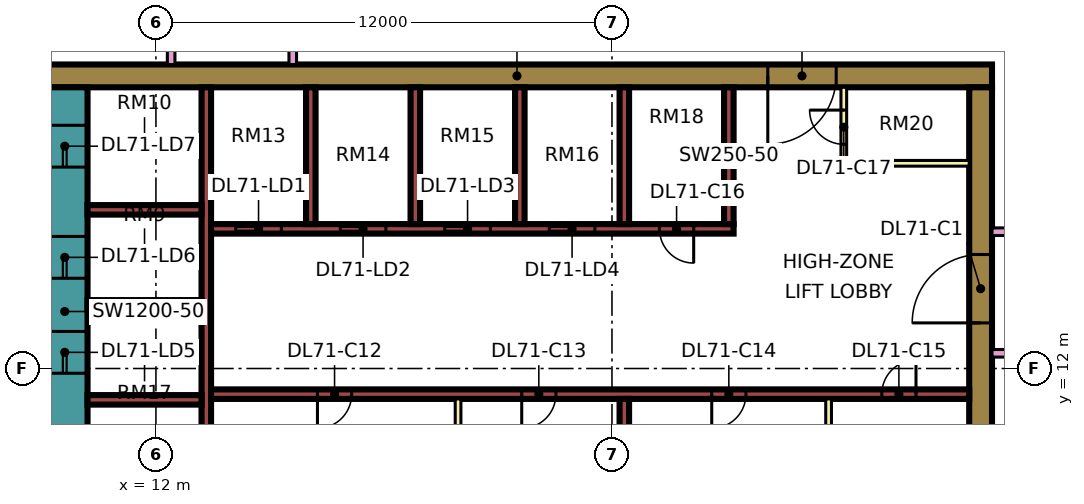
"""IFC4 building model, lengths in metres.
Left out: names, types, materials, properties, quantities, classifications, styles, units other than length and angle.
Written with IfcOpenShell. Run it as: python <this file> out.ifc"""

import sys

from ifc_helpers import new_model, si_unit, direction, frame, frame_2d, origin, place, context, subcontext, project, spatial, rectangle, extrude, element, fill, save


model = new_model("IFC4")
c1 = context("Model", 3, precision=1e-05, world=origin(), true_north=direction((0.0, 1.0)))
c2 = subcontext(c1, "Body", "Model", "MODEL_VIEW")
j1 = project(units=[si_unit("LENGTHUNIT", "METRE"), si_unit("PLANEANGLEUNIT", "RADIAN")], contexts=[c1])
p1 = place(None, origin())
s1 = spatial("IfcSite", under=j1, at=p1, CompositionType="ELEMENT")
p2 = place(p1, origin())
s2 = spatial("IfcBuilding", under=s1, at=p2, CompositionType="ELEMENT")
p3 = place(p2, frame((0.0, 0.0, 303.4)))
s3 = spatial("IfcBuildingStorey", under=s2, at=p3, CompositionType="ELEMENT", Elevation=303.4)
p4 = place(p3, frame((9.0, 19.7, 0.0), z_axis=(0.0, 0.0, 1.0), x_axis=(1.0, 0.0, 0.0)))
e1 = element("IfcWall", 1, at=p4, inside=s3, PredefinedType="SHEAR", context=c2, shape_type="SweptSolid", body=[
    extrude(rectangle(XDim=25.0, YDim=0.6, at=frame_2d((12.5, 0.0))), origin(), (0.0, 0.0, 1.0), 3.75),
])
p5 = place(p4, frame((19.1, 0.0, 0.0)))
e2 = element("IfcOpeningElement", 2, at=p5, cuts=e1, PredefinedType="OPENING", context=c2, shape_type="SweptSolid", body=[
    extrude(rectangle(XDim=1.8, YDim=2.4, at=frame_2d((0.9, 1.2))), frame((0.0, 0.31, 0.0), z_axis=(0.0, -1.0, 0.0), x_axis=(1.0, 0.0, 0.0)), (0.0, 0.0, 1.0), 0.62),
])
p6 = place(p3, frame((9.6, 7.6, 0.0), z_axis=(0.0, 0.0, 1.0), x_axis=(0.0, 1.0, 0.0)))
e3 = element("IfcWall", 3, at=p6, inside=s3, PredefinedType="SHEAR", context=c2, shape_type="SweptSolid", body=[
    extrude(rectangle(XDim=11.8, YDim=1.2, at=frame_2d((5.9, 0.0))), origin(), (0.0, 0.0, 1.0), 3.75),
])
p7 = place(p6, frame((4.275, 0.0, 0.0)))
e4 = element("IfcOpeningElement", 4, at=p7, cuts=e3, PredefinedType="OPENING", context=c2, shape_type="SweptSolid", body=[
    extrude(rectangle(XDim=1.1, YDim=2.2, at=frame_2d((0.55, 1.1))), frame((0.0, 0.61, 0.0), z_axis=(0.0, -1.0, 0.0), x_axis=(1.0, 0.0, 0.0)), (0.0, 0.0, 1.0), 1.22),
])
p8 = place(p6, frame((6.775, 0.0, 0.0)))
e5 = element("IfcOpeningElement", 5, at=p8, cuts=e3, PredefinedType="OPENING", context=c2, shape_type="SweptSolid", body=[
    extrude(rectangle(XDim=1.1, YDim=2.2, at=frame_2d((0.55, 1.1))), frame((0.0, 0.61, 0.0), z_axis=(0.0, -1.0, 0.0), x_axis=(1.0, 0.0, 0.0)), (0.0, 0.0, 1.0), 1.22),
])
p9 = place(p6, frame((9.7, 0.0, 0.0)))
e6 = element("IfcOpeningElement", 6, at=p9, cuts=e3, PredefinedType="OPENING", context=c2, shape_type="SweptSolid", body=[
    extrude(rectangle(XDim=1.1, YDim=2.2, at=frame_2d((0.55, 1.1))), frame((0.0, 0.61, 0.0), z_axis=(0.0, -1.0, 0.0), x_axis=(1.0, 0.0, 0.0)), (0.0, 0.0, 1.0), 1.22),
])
p10 = place(p6, frame((1.95, 0.0, 0.0)))
e7 = element("IfcOpeningElement", 7, at=p10, cuts=e3, PredefinedType="OPENING", context=c2, shape_type="SweptSolid", body=[
    extrude(rectangle(XDim=0.9, YDim=2.1, at=frame_2d((0.45, 1.05))), frame((0.0, 0.61, 0.0), z_axis=(0.0, -1.0, 0.0), x_axis=(1.0, 0.0, 0.0)), (0.0, 0.0, 1.0), 1.22),
])
p11 = place(p3, frame((33.7, 7.6, 0.0), z_axis=(0.0, 0.0, 1.0), x_axis=(0.0, 1.0, 0.0)))
e8 = element("IfcWall", 8, at=p11, inside=s3, PredefinedType="SHEAR", context=c2, shape_type="SweptSolid", body=[
    extrude(rectangle(XDim=11.8, YDim=0.6, at=frame_2d((5.9, 0.0))), origin(), (0.0, 0.0, 1.0), 3.75),
])
p12 = place(p11, frame((5.6, 0.0, 0.0)))
e9 = element("IfcOpeningElement", 9, at=p12, cuts=e8, PredefinedType="OPENING", context=c2, shape_type="SweptSolid", body=[
    extrude(rectangle(XDim=1.8, YDim=2.4, at=frame_2d((0.9, 1.2))), frame((0.0, 0.31, 0.0), z_axis=(0.0, -1.0, 0.0), x_axis=(1.0, 0.0, 0.0)), (0.0, 0.0, 1.0), 0.62),
])
p13 = place(p3, frame((13.325, 7.6, 0.0), z_axis=(0.0, 0.0, 1.0), x_axis=(0.0, 1.0, 0.0)))
e10 = element("IfcWall", 10, at=p13, inside=s3, PredefinedType="SHEAR", context=c2, shape_type="SweptSolid", body=[
    extrude(rectangle(XDim=11.8, YDim=0.25, at=frame_2d((5.9, 0.0))), origin(), (0.0, 0.0, 1.0), 3.75),
])
p14 = place(p3, frame((13.45, 11.325, 0.0), z_axis=(0.0, 0.0, 1.0), x_axis=(1.0, 0.0, 0.0)))
e11 = element("IfcWall", 11, at=p14, inside=s3, PredefinedType="SHEAR", context=c2, shape_type="SweptSolid", body=[
    extrude(rectangle(XDim=19.95, YDim=0.25, at=frame_2d((9.975, 0.0))), origin(), (0.0, 0.0, 1.0), 3.75),
])
p15 = place(p14, frame((2.8, 0.0, 0.0)))
e12 = element("IfcOpeningElement", 12, at=p15, cuts=e11, PredefinedType="OPENING", context=c2, shape_type="SweptSolid", body=[
    extrude(rectangle(XDim=0.9, YDim=2.1, at=frame_2d((0.45, 1.05))), frame((0.0, 0.135, 0.0), z_axis=(0.0, -1.0, 0.0), x_axis=(1.0, 0.0, 0.0)), (0.0, 0.0, 1.0), 0.27),
])
p16 = place(p14, frame((8.175, 0.0, 0.0)))
e13 = element("IfcOpeningElement", 13, at=p16, cuts=e11, PredefinedType="OPENING", context=c2, shape_type="SweptSolid", body=[
    extrude(rectangle(XDim=0.9, YDim=2.1, at=frame_2d((0.45, 1.05))), frame((0.0, 0.135, 0.0), z_axis=(0.0, -1.0, 0.0), x_axis=(1.0, 0.0, 0.0)), (0.0, 0.0, 1.0), 0.27),
])
p17 = place(p14, frame((13.175, 0.0, 0.0)))
e14 = element("IfcOpeningElement", 14, at=p17, cuts=e11, PredefinedType="OPENING", context=c2, shape_type="SweptSolid", body=[
    extrude(rectangle(XDim=0.9, YDim=2.1, at=frame_2d((0.45, 1.05))), frame((0.0, 0.135, 0.0), z_axis=(0.0, -1.0, 0.0), x_axis=(1.0, 0.0, 0.0)), (0.0, 0.0, 1.0), 0.27),
])
p18 = place(p14, frame((17.65, 0.0, 0.0)))
e15 = element("IfcOpeningElement", 15, at=p18, cuts=e11, PredefinedType="OPENING", context=c2, shape_type="SweptSolid", body=[
    extrude(rectangle(XDim=0.9, YDim=2.1, at=frame_2d((0.45, 1.05))), frame((0.0, 0.135, 0.0), z_axis=(0.0, -1.0, 0.0), x_axis=(1.0, 0.0, 0.0)), (0.0, 0.0, 1.0), 0.27),
])
p19 = place(p3, frame((13.45, 15.675, 0.0), z_axis=(0.0, 0.0, 1.0), x_axis=(1.0, 0.0, 0.0)))
e16 = element("IfcWall", 16, at=p19, inside=s3, PredefinedType="SHEAR", context=c2, shape_type="SweptSolid", body=[
    extrude(rectangle(XDim=13.75, YDim=0.25, at=frame_2d((6.875, 0.0))), origin(), (0.0, 0.0, 1.0), 3.75),
])
p20 = place(p19, frame((0.65, 0.0, 0.0)))
e17 = element("IfcOpeningElement", 17, at=p20, cuts=e16, PredefinedType="OPENING", context=c2, shape_type="SweptSolid", body=[
    extrude(rectangle(XDim=1.2, YDim=2.2, at=frame_2d((0.6, 1.1))), frame((0.0, 0.135, 0.0), z_axis=(0.0, -1.0, 0.0), x_axis=(1.0, 0.0, 0.0)), (0.0, 0.0, 1.0), 0.27),
])
p21 = place(p19, frame((3.4, 0.0, 0.0)))
e18 = element("IfcOpeningElement", 18, at=p21, cuts=e16, PredefinedType="OPENING", context=c2, shape_type="SweptSolid", body=[
    extrude(rectangle(XDim=1.2, YDim=2.2, at=frame_2d((0.6, 1.1))), frame((0.0, 0.135, 0.0), z_axis=(0.0, -1.0, 0.0), x_axis=(1.0, 0.0, 0.0)), (0.0, 0.0, 1.0), 0.27),
])
p22 = place(p19, frame((6.15, 0.0, 0.0)))
e19 = element("IfcOpeningElement", 19, at=p22, cuts=e16, PredefinedType="OPENING", context=c2, shape_type="SweptSolid", body=[
    extrude(rectangle(XDim=1.2, YDim=2.2, at=frame_2d((0.6, 1.1))), frame((0.0, 0.135, 0.0), z_axis=(0.0, -1.0, 0.0), x_axis=(1.0, 0.0, 0.0)), (0.0, 0.0, 1.0), 0.27),
])
p23 = place(p19, frame((8.9, 0.0, 0.0)))
e20 = element("IfcOpeningElement", 20, at=p23, cuts=e16, PredefinedType="OPENING", context=c2, shape_type="SweptSolid", body=[
    extrude(rectangle(XDim=1.2, YDim=2.2, at=frame_2d((0.6, 1.1))), frame((0.0, 0.135, 0.0), z_axis=(0.0, -1.0, 0.0), x_axis=(1.0, 0.0, 0.0)), (0.0, 0.0, 1.0), 0.27),
])
p24 = place(p19, frame((11.8, 0.0, 0.0)))
e21 = element("IfcOpeningElement", 21, at=p24, cuts=e16, PredefinedType="OPENING", context=c2, shape_type="SweptSolid", body=[
    extrude(rectangle(XDim=0.9, YDim=2.1, at=frame_2d((0.45, 1.05))), frame((0.0, 0.135, 0.0), z_axis=(0.0, -1.0, 0.0), x_axis=(1.0, 0.0, 0.0)), (0.0, 0.0, 1.0), 0.27),
])
for number, where, z_axis, x_axis in (
    (22, (10.2, 11.175, 0.0), (0.0, 0.0, 1.0), (1.0, 0.0, 0.0)),
    (23, (10.2, 13.675, 0.0), (0.0, 0.0, 1.0), (1.0, 0.0, 0.0)),
    (24, (10.2, 16.175, 0.0), (0.0, 0.0, 1.0), (1.0, 0.0, 0.0)),
):
    element("IfcWall", number, at=place(p3, frame(where, z_axis=z_axis, x_axis=x_axis)), inside=s3, PredefinedType="SHEAR", context=c2, shape_type="SweptSolid", body=[
        extrude(rectangle(XDim=3.0, YDim=0.25, at=frame_2d((1.5, 0.0))), origin(), (0.0, 0.0, 1.0), 3.75),
    ])
for number, where, z_axis, x_axis in (
    (25, (24.325, 7.6, 0.0), (0.0, 0.0, 1.0), (0.0, 1.0, 0.0)),
    (26, (16.075, 15.8, 0.0), (0.0, 0.0, 1.0), (0.0, 1.0, 0.0)),
    (27, (18.825, 15.8, 0.0), (0.0, 0.0, 1.0), (0.0, 1.0, 0.0)),
    (28, (21.575, 15.8, 0.0), (0.0, 0.0, 1.0), (0.0, 1.0, 0.0)),
    (29, (24.325, 15.8, 0.0), (0.0, 0.0, 1.0), (0.0, 1.0, 0.0)),
    (30, (27.075, 15.8, 0.0), (0.0, 0.0, 1.0), (0.0, 1.0, 0.0)),
):
    element("IfcWall", number, at=place(p3, frame(where, z_axis=z_axis, x_axis=x_axis)), inside=s3, PredefinedType="SHEAR", context=c2, shape_type="SweptSolid", body=[
        extrude(rectangle(XDim=3.6, YDim=0.25, at=frame_2d((1.8, 0.0))), origin(), (0.0, 0.0, 1.0), 3.75),
    ])
p25 = place(p3, frame((-1.447, 12.553, 0.0), z_axis=(0.0, 0.0, 1.0), x_axis=(0.707106781187, -0.707106781187, 0.0)))
e31 = element("IfcWall", 31, at=p25, inside=s3, PredefinedType="SOLIDWALL", context=c2, shape_type="SweptSolid", body=[
    extrude(rectangle(XDim=19.799, YDim=0.15, at=frame_2d((9.899, 0.0))), origin(), (0.0, 0.0, 1.0), 3.35),
])
p26 = place(p25, frame((2.212, 0.0, 0.45)))
e32 = element("IfcOpeningElement", 32, at=p26, cuts=e31, PredefinedType="OPENING", context=c2, shape_type="SweptSolid", body=[
    extrude(rectangle(XDim=3.0, YDim=2.4, at=frame_2d((1.5, 1.2))), frame((0.0, 0.085, 0.0), z_axis=(0.0, -1.0, 0.0), x_axis=(1.0, 0.0, 0.0)), (0.0, 0.0, 1.0), 0.17),
])
p27 = place(p25, frame((10.216, 0.0, 0.45)))
e33 = element("IfcOpeningElement", 33, at=p27, cuts=e31, PredefinedType="OPENING", context=c2, shape_type="SweptSolid", body=[
    extrude(rectangle(XDim=3.0, YDim=2.4, at=frame_2d((1.5, 1.2))), frame((0.0, 0.085, 0.0), z_axis=(0.0, -1.0, 0.0), x_axis=(1.0, 0.0, 0.0)), (0.0, 0.0, 1.0), 0.17),
])
for number, where, z_axis, x_axis in (
    (34, (19.95, 7.6, 0.0), (0.0, 0.0, 1.0), (0.0, 1.0, 0.0)),
    (35, (29.7, 7.6, 0.0), (0.0, 0.0, 1.0), (0.0, 1.0, 0.0)),
):
    element("IfcWall", number, at=place(p3, frame(where, z_axis=z_axis, x_axis=x_axis)), inside=s3, PredefinedType="PARTITIONING", context=c2, shape_type="SweptSolid", body=[
        extrude(rectangle(XDim=3.6, YDim=0.15, at=frame_2d((1.8, 0.0))), origin(), (0.0, 0.0, 1.0), 3.35),
    ])
p28 = place(p3, frame((30.1, 17.4, 0.0), z_axis=(0.0, 0.0, 1.0), x_axis=(0.0, 1.0, 0.0)))
e36 = element("IfcWall", 36, at=p28, inside=s3, PredefinedType="PARTITIONING", context=c2, shape_type="SweptSolid", body=[
    extrude(rectangle(XDim=2.0, YDim=0.15, at=frame_2d((1.0, 0.0))), origin(), (0.0, 0.0, 1.0), 3.35),
])
p29 = place(p28, frame((0.5, 0.0, 0.0)))
e37 = element("IfcOpeningElement", 37, at=p29, cuts=e36, PredefinedType="OPENING", context=c2, shape_type="SweptSolid", body=[
    extrude(rectangle(XDim=0.9, YDim=2.1, at=frame_2d((0.45, 1.05))), frame((0.0, 0.085, 0.0), z_axis=(0.0, -1.0, 0.0), x_axis=(1.0, 0.0, 0.0)), (0.0, 0.0, 1.0), 0.17),
])
p30 = place(p3, frame((30.1, 17.4, 0.0), z_axis=(0.0, 0.0, 1.0), x_axis=(1.0, 0.0, 0.0)))
e38 = element("IfcWall", 38, at=p30, inside=s3, PredefinedType="PARTITIONING", context=c2, shape_type="SweptSolid", body=[
    extrude(rectangle(XDim=3.3, YDim=0.15, at=frame_2d((1.65, 0.0))), origin(), (0.0, 0.0, 1.0), 3.35),
])
p31 = place(p3, frame((12.4, 20.0, 0.0), z_axis=(0.0, 0.0, 1.0), x_axis=(0.0, 1.0, 0.0)))
e39 = element("IfcWall", 39, at=p31, inside=s3, PredefinedType="PARTITIONING", context=c2, shape_type="SweptSolid", body=[
    extrude(rectangle(XDim=34.0, YDim=0.2, at=frame_2d((17.0, 0.0))), origin(), (0.0, 0.0, 1.0), 3.35),
])
p32 = place(p31, frame((19.8, 0.0, 0.0)))
e40 = element("IfcOpeningElement", 40, at=p32, cuts=e39, PredefinedType="OPENING", context=c2, shape_type="SweptSolid", body=[
    extrude(rectangle(XDim=1.0, YDim=2.1, at=frame_2d((0.5, 1.05))), frame((0.0, 0.11, 0.0), z_axis=(0.0, -1.0, 0.0), x_axis=(1.0, 0.0, 0.0)), (0.0, 0.0, 1.0), 0.22),
])
p33 = place(p31, frame((0.6, 0.0, 0.0)))
e41 = element("IfcOpeningElement", 41, at=p33, cuts=e39, PredefinedType="OPENING", context=c2, shape_type="SweptSolid", body=[
    extrude(rectangle(XDim=1.2, YDim=2.1, at=frame_2d((0.6, 1.05))), frame((0.0, 0.11, 0.0), z_axis=(0.0, -1.0, 0.0), x_axis=(1.0, 0.0, 0.0)), (0.0, 0.0, 1.0), 0.22),
])
p34 = place(p31, frame((4.5, 0.0, 0.0)))
e42 = element("IfcOpeningElement", 42, at=p34, cuts=e39, PredefinedType="OPENING", context=c2, shape_type="SweptSolid", body=[
    extrude(rectangle(XDim=1.0, YDim=2.1, at=frame_2d((0.5, 1.05))), frame((0.0, 0.11, 0.0), z_axis=(0.0, -1.0, 0.0), x_axis=(1.0, 0.0, 0.0)), (0.0, 0.0, 1.0), 0.22),
])
p35 = place(p3, frame((15.6, 20.0, 0.0), z_axis=(0.0, 0.0, 1.0), x_axis=(0.0, 1.0, 0.0)))
e43 = element("IfcWall", 43, at=p35, inside=s3, PredefinedType="PARTITIONING", context=c2, shape_type="SweptSolid", body=[
    extrude(rectangle(XDim=27.775, YDim=0.2, at=frame_2d((13.887, 0.0))), origin(), (0.0, 0.0, 1.0), 3.35),
])
p36 = place(p35, frame((7.0, 0.0, 0.0)))
e44 = element("IfcOpeningElement", 44, at=p36, cuts=e43, PredefinedType="OPENING", context=c2, shape_type="SweptSolid", body=[
    extrude(rectangle(XDim=1.0, YDim=2.1, at=frame_2d((0.5, 1.05))), frame((0.0, 0.11, 0.0), z_axis=(0.0, -1.0, 0.0), x_axis=(1.0, 0.0, 0.0)), (0.0, 0.0, 1.0), 0.22),
])
p37 = place(p35, frame((12.95, 0.0, 0.0)))
e45 = element("IfcOpeningElement", 45, at=p37, cuts=e43, PredefinedType="OPENING", context=c2, shape_type="SweptSolid", body=[
    extrude(rectangle(XDim=1.0, YDim=2.1, at=frame_2d((0.5, 1.05))), frame((0.0, 0.11, 0.0), z_axis=(0.0, -1.0, 0.0), x_axis=(1.0, 0.0, 0.0)), (0.0, 0.0, 1.0), 0.22),
])
p38 = place(p35, frame((16.75, 0.0, 0.0)))
e46 = element("IfcOpeningElement", 46, at=p38, cuts=e43, PredefinedType="OPENING", context=c2, shape_type="SweptSolid", body=[
    extrude(rectangle(XDim=1.0, YDim=2.1, at=frame_2d((0.5, 1.05))), frame((0.0, 0.11, 0.0), z_axis=(0.0, -1.0, 0.0), x_axis=(1.0, 0.0, 0.0)), (0.0, 0.0, 1.0), 0.22),
])
p39 = place(p35, frame((1.15, 0.0, 0.0)))
e47 = element("IfcOpeningElement", 47, at=p39, cuts=e43, PredefinedType="OPENING", context=c2, shape_type="SweptSolid", body=[
    extrude(rectangle(XDim=1.8, YDim=2.1, at=frame_2d((0.9, 1.05))), frame((0.0, 0.11, 0.0), z_axis=(0.0, -1.0, 0.0), x_axis=(1.0, 0.0, 0.0)), (0.0, 0.0, 1.0), 0.22),
])
p40 = place(p35, frame((25.9, 0.0, 0.0)))
e48 = element("IfcOpeningElement", 48, at=p40, cuts=e43, PredefinedType="OPENING", context=c2, shape_type="SweptSolid", body=[
    extrude(rectangle(XDim=1.0, YDim=2.1, at=frame_2d((0.5, 1.05))), frame((0.0, 0.11, 0.0), z_axis=(0.0, -1.0, 0.0), x_axis=(1.0, 0.0, 0.0)), (0.0, 0.0, 1.0), 0.22),
])
p41 = place(p3, frame((34.0, 12.4, 0.0), z_axis=(0.0, 0.0, 1.0), x_axis=(1.0, 0.0, 0.0)))
e49 = element("IfcWall", 49, at=p41, inside=s3, PredefinedType="PARTITIONING", context=c2, shape_type="SweptSolid", body=[
    extrude(rectangle(XDim=2.401, YDim=0.2, at=frame_2d((1.2, 0.0))), origin(), (0.0, 0.0, 1.0), 3.35),
])
p42 = place(p3, frame((34.0, 15.6, 0.0), z_axis=(0.0, 0.0, 1.0), x_axis=(1.0, 0.0, 0.0)))
e50 = element("IfcWall", 50, at=p42, inside=s3, PredefinedType="PARTITIONING", context=c2, shape_type="SweptSolid", body=[
    extrude(rectangle(XDim=10.35, YDim=0.2, at=frame_2d((5.175, 0.0))), origin(), (0.0, 0.0, 1.0), 3.35),
])
p43 = place(p42, frame((5.6, 0.0, 0.0)))
e51 = element("IfcOpeningElement", 51, at=p43, cuts=e50, PredefinedType="OPENING", context=c2, shape_type="SweptSolid", body=[
    extrude(rectangle(XDim=1.0, YDim=2.1, at=frame_2d((0.5, 1.05))), frame((0.0, 0.11, 0.0), z_axis=(0.0, -1.0, 0.0), x_axis=(1.0, 0.0, 0.0)), (0.0, 0.0, 1.0), 0.22),
])
p44 = place(p42, frame((0.45, 0.0, 0.0)))
e52 = element("IfcOpeningElement", 52, at=p44, cuts=e50, PredefinedType="OPENING", context=c2, shape_type="SweptSolid", body=[
    extrude(rectangle(XDim=1.2, YDim=2.1, at=frame_2d((0.6, 1.05))), frame((0.0, 0.11, 0.0), z_axis=(0.0, -1.0, 0.0), x_axis=(1.0, 0.0, 0.0)), (0.0, 0.0, 1.0), 0.22),
])
p45 = place(p20, origin())
e53 = element("IfcDoor", 53, at=p45, inside=s3, OperationType="DOUBLE_DOOR_SLIDING", PredefinedType="DOOR", context=c2, shape_type="SweptSolid", body=[
    extrude(rectangle(XDim=1.2, YDim=2.2, at=frame_2d((0.6, 1.1))), frame((0.0, 0.025, 0.0), z_axis=(0.0, -1.0, 0.0), x_axis=(1.0, 0.0, 0.0)), (0.0, 0.0, 1.0), 0.05),
])
fill(e17, e53)
p46 = place(p21, origin())
e54 = element("IfcDoor", 54, at=p46, inside=s3, OperationType="DOUBLE_DOOR_SLIDING", PredefinedType="DOOR", context=c2, shape_type="SweptSolid", body=[
    extrude(rectangle(XDim=1.2, YDim=2.2, at=frame_2d((0.6, 1.1))), frame((0.0, 0.025, 0.0), z_axis=(0.0, -1.0, 0.0), x_axis=(1.0, 0.0, 0.0)), (0.0, 0.0, 1.0), 0.05),
])
fill(e18, e54)
p47 = place(p22, origin())
e55 = element("IfcDoor", 55, at=p47, inside=s3, OperationType="DOUBLE_DOOR_SLIDING", PredefinedType="DOOR", context=c2, shape_type="SweptSolid", body=[
    extrude(rectangle(XDim=1.2, YDim=2.2, at=frame_2d((0.6, 1.1))), frame((0.0, 0.025, 0.0), z_axis=(0.0, -1.0, 0.0), x_axis=(1.0, 0.0, 0.0)), (0.0, 0.0, 1.0), 0.05),
])
fill(e19, e55)
p48 = place(p23, origin())
e56 = element("IfcDoor", 56, at=p48, inside=s3, OperationType="DOUBLE_DOOR_SLIDING", PredefinedType="DOOR", context=c2, shape_type="SweptSolid", body=[
    extrude(rectangle(XDim=1.2, YDim=2.2, at=frame_2d((0.6, 1.1))), frame((0.0, 0.025, 0.0), z_axis=(0.0, -1.0, 0.0), x_axis=(1.0, 0.0, 0.0)), (0.0, 0.0, 1.0), 0.05),
])
fill(e20, e56)
p49 = place(p7, origin())
e57 = element("IfcDoor", 57, at=p49, inside=s3, OperationType="DOUBLE_DOOR_SLIDING", PredefinedType="DOOR", context=c2, shape_type="SweptSolid", body=[
    extrude(rectangle(XDim=1.1, YDim=2.2, at=frame_2d((0.55, 1.1))), frame((0.0, 0.025, 0.0), z_axis=(0.0, -1.0, 0.0), x_axis=(1.0, 0.0, 0.0)), (0.0, 0.0, 1.0), 0.05),
])
fill(e4, e57)
p50 = place(p8, origin())
e58 = element("IfcDoor", 58, at=p50, inside=s3, OperationType="DOUBLE_DOOR_SLIDING", PredefinedType="DOOR", context=c2, shape_type="SweptSolid", body=[
    extrude(rectangle(XDim=1.1, YDim=2.2, at=frame_2d((0.55, 1.1))), frame((0.0, 0.025, 0.0), z_axis=(0.0, -1.0, 0.0), x_axis=(1.0, 0.0, 0.0)), (0.0, 0.0, 1.0), 0.05),
])
fill(e5, e58)
p51 = place(p9, origin())
e59 = element("IfcDoor", 59, at=p51, inside=s3, OperationType="DOUBLE_DOOR_SLIDING", PredefinedType="DOOR", context=c2, shape_type="SweptSolid", body=[
    extrude(rectangle(XDim=1.1, YDim=2.2, at=frame_2d((0.55, 1.1))), frame((0.0, 0.025, 0.0), z_axis=(0.0, -1.0, 0.0), x_axis=(1.0, 0.0, 0.0)), (0.0, 0.0, 1.0), 0.05),
])
fill(e6, e59)
p52 = place(p12, origin())
e60 = element("IfcDoor", 60, at=p52, inside=s3, OperationType="DOUBLE_DOOR_SINGLE_SWING", PredefinedType="DOOR", context=c2, shape_type="SweptSolid", body=[
    extrude(rectangle(XDim=1.8, YDim=2.4, at=frame_2d((0.9, 1.2))), frame((0.0, 0.025, 0.0), z_axis=(0.0, -1.0, 0.0), x_axis=(1.0, 0.0, 0.0)), (0.0, 0.0, 1.0), 0.05),
])
fill(e9, e60)
p53 = place(p5, frame((1.8, 0.0, 0.0), z_axis=(0.0, 0.0, 1.0), x_axis=(-1.0, 0.0, 0.0)))
e61 = element("IfcDoor", 61, at=p53, inside=s3, OperationType="DOUBLE_DOOR_SINGLE_SWING", PredefinedType="DOOR", context=c2, shape_type="SweptSolid", body=[
    extrude(rectangle(XDim=1.8, YDim=2.4, at=frame_2d((0.9, 1.2))), frame((0.0, 0.025, 0.0), z_axis=(0.0, -1.0, 0.0), x_axis=(1.0, 0.0, 0.0)), (0.0, 0.0, 1.0), 0.05),
])
fill(e2, e61)
p54 = place(p15, frame((0.9, 0.0, 0.0), z_axis=(0.0, 0.0, 1.0), x_axis=(-1.0, 0.0, 0.0)))
e62 = element("IfcDoor", 62, at=p54, inside=s3, OperationType="SINGLE_SWING_LEFT", PredefinedType="DOOR", context=c2, shape_type="SweptSolid", body=[
    extrude(rectangle(XDim=0.9, YDim=2.1, at=frame_2d((0.45, 1.05))), frame((0.0, 0.025, 0.0), z_axis=(0.0, -1.0, 0.0), x_axis=(1.0, 0.0, 0.0)), (0.0, 0.0, 1.0), 0.05),
])
fill(e12, e62)
p55 = place(p16, frame((0.9, 0.0, 0.0), z_axis=(0.0, 0.0, 1.0), x_axis=(-1.0, 0.0, 0.0)))
e63 = element("IfcDoor", 63, at=p55, inside=s3, OperationType="SINGLE_SWING_LEFT", PredefinedType="DOOR", context=c2, shape_type="SweptSolid", body=[
    extrude(rectangle(XDim=0.9, YDim=2.1, at=frame_2d((0.45, 1.05))), frame((0.0, 0.025, 0.0), z_axis=(0.0, -1.0, 0.0), x_axis=(1.0, 0.0, 0.0)), (0.0, 0.0, 1.0), 0.05),
])
fill(e13, e63)
p56 = place(p17, frame((0.9, 0.0, 0.0), z_axis=(0.0, 0.0, 1.0), x_axis=(-1.0, 0.0, 0.0)))
e64 = element("IfcDoor", 64, at=p56, inside=s3, OperationType="SINGLE_SWING_LEFT", PredefinedType="DOOR", context=c2, shape_type="SweptSolid", body=[
    extrude(rectangle(XDim=0.9, YDim=2.1, at=frame_2d((0.45, 1.05))), frame((0.0, 0.025, 0.0), z_axis=(0.0, -1.0, 0.0), x_axis=(1.0, 0.0, 0.0)), (0.0, 0.0, 1.0), 0.05),
])
fill(e14, e64)
p57 = place(p18, frame((0.9, 0.0, 0.0), z_axis=(0.0, 0.0, 1.0), x_axis=(-1.0, 0.0, 0.0)))
e65 = element("IfcDoor", 65, at=p57, inside=s3, OperationType="SINGLE_SWING_RIGHT", PredefinedType="DOOR", context=c2, shape_type="SweptSolid", body=[
    extrude(rectangle(XDim=0.9, YDim=2.1, at=frame_2d((0.45, 1.05))), frame((0.0, 0.025, 0.0), z_axis=(0.0, -1.0, 0.0), x_axis=(1.0, 0.0, 0.0)), (0.0, 0.0, 1.0), 0.05),
])
fill(e15, e65)
p58 = place(p24, origin())
e66 = element("IfcDoor", 66, at=p58, inside=s3, OperationType="SINGLE_SWING_RIGHT", PredefinedType="DOOR", context=c2, shape_type="SweptSolid", body=[
    extrude(rectangle(XDim=0.9, YDim=2.1, at=frame_2d((0.45, 1.05))), frame((0.0, 0.025, 0.0), z_axis=(0.0, -1.0, 0.0), x_axis=(1.0, 0.0, 0.0)), (0.0, 0.0, 1.0), 0.05),
])
fill(e21, e66)
p59 = place(p29, frame((0.9, 0.0, 0.0), z_axis=(0.0, 0.0, 1.0), x_axis=(-1.0, 0.0, 0.0)))
e67 = element("IfcDoor", 67, at=p59, inside=s3, OperationType="SINGLE_SWING_RIGHT", PredefinedType="DOOR", context=c2, shape_type="SweptSolid", body=[
    extrude(rectangle(XDim=0.9, YDim=2.1, at=frame_2d((0.45, 1.05))), frame((0.0, 0.025, 0.0), z_axis=(0.0, -1.0, 0.0), x_axis=(1.0, 0.0, 0.0)), (0.0, 0.0, 1.0), 0.05),
])
fill(e37, e67)
save(model, sys.argv[1])
